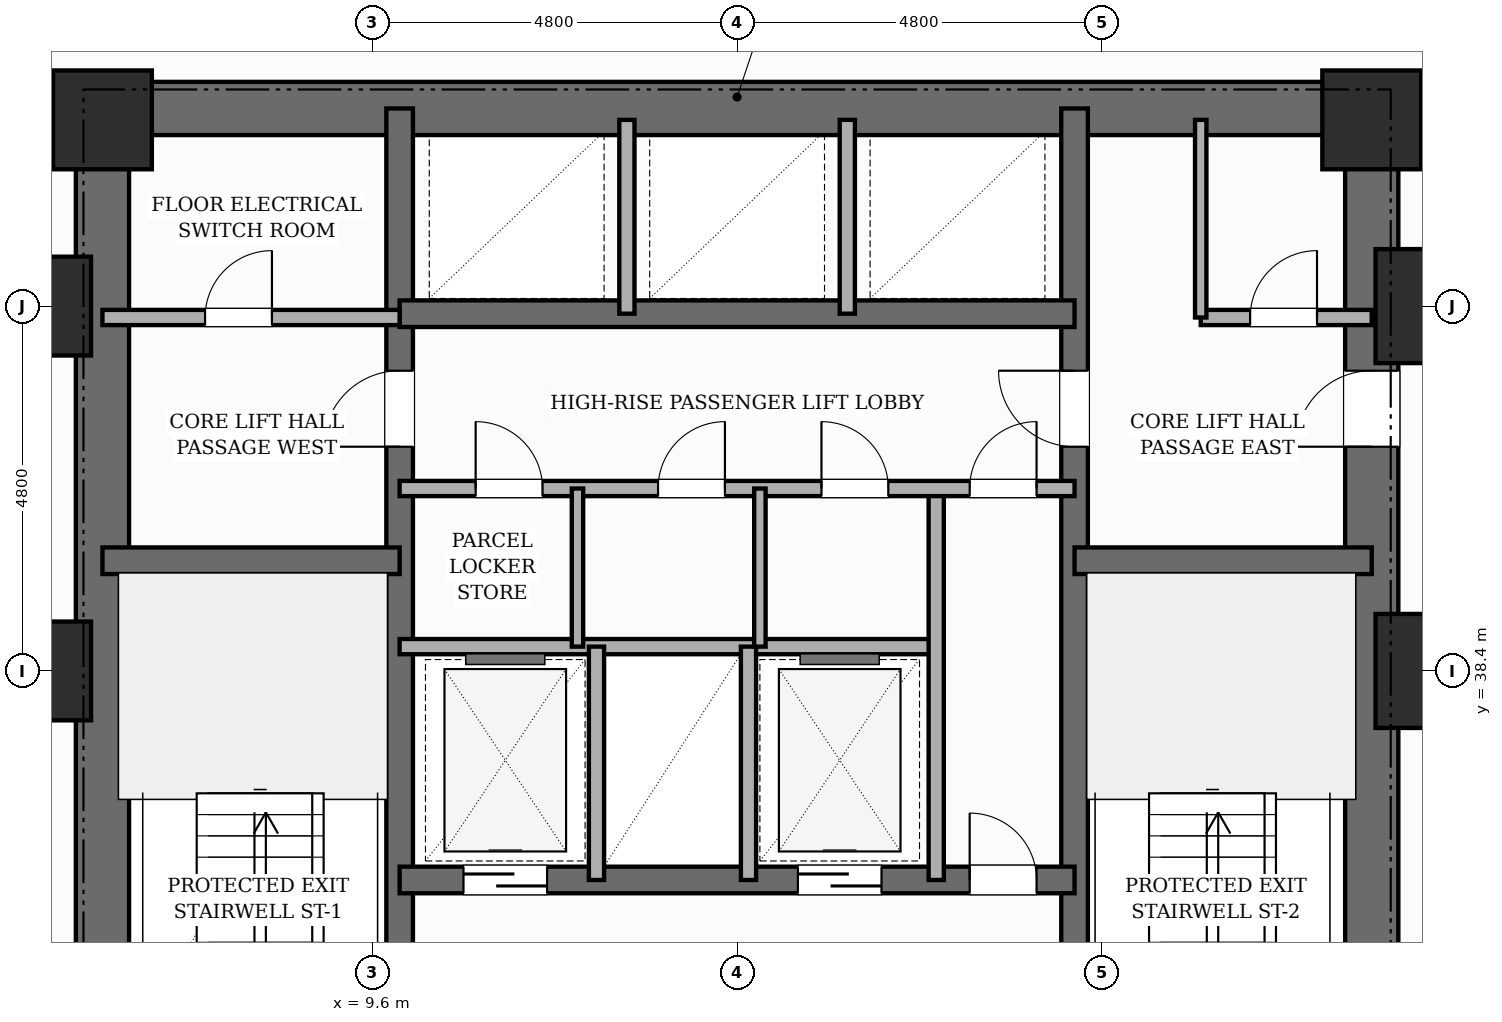
"""IFC4 building model, lengths in metres.
Left out: names, types, materials, properties, quantities, classifications, styles, units other than length and angle.
Written with IfcOpenShell. Run it as: python <this file> out.ifc"""

import sys

from ifc_helpers import new_model, si_unit, direction, frame, frame_2d, origin, origin_2d, place, context, subcontext, project, spatial, rectangle, extrude, element, fill, save


model = new_model("IFC4")
c1 = context("Model", 3, precision=1e-05, world=origin(), true_north=direction((0.0, 1.0)))
c2 = subcontext(c1, "Body", "Model", "MODEL_VIEW")
j1 = project(units=[si_unit("LENGTHUNIT", "METRE"), si_unit("PLANEANGLEUNIT", "RADIAN")], contexts=[c1])
p1 = place(None, origin())
s1 = spatial("IfcSite", under=j1, at=p1, CompositionType="ELEMENT")
p2 = place(p1, origin())
s2 = spatial("IfcBuilding", under=s1, at=p2, CompositionType="ELEMENT")
p3 = place(p2, frame((0.0, 0.0, 19.6)))
s3 = spatial("IfcBuildingStorey", under=s2, at=p3, CompositionType="ELEMENT", Elevation=19.6)
p4 = place(p3, frame((6.05, 30.55, 0.0), z_axis=(0.0, 0.0, 1.0), x_axis=(0.0, 1.0, 0.0)))
e1 = element("IfcWall", 1, at=p4, inside=s3, PredefinedType="SHEAR", context=c2, shape_type="SweptSolid", body=[
    extrude(rectangle(XDim=15.6, YDim=0.7, at=frame_2d((7.8, 0.0))), origin(), (0.0, 0.0, 1.0), 5.4),
])
p5 = place(p3, frame((22.75, 30.55, 0.0), z_axis=(0.0, 0.0, 1.0), x_axis=(0.0, 1.0, 0.0)))
e2 = element("IfcWall", 2, at=p5, inside=s3, PredefinedType="SHEAR", context=c2, shape_type="SweptSolid", body=[
    extrude(rectangle(XDim=15.6, YDim=0.7, at=frame_2d((7.8, 0.0))), origin(), (0.0, 0.0, 1.0), 5.4),
])
p6 = place(p5, frame((10.8, 0.0, 0.0)))
e3 = element("IfcOpeningElement", 3, at=p6, cuts=e2, PredefinedType="OPENING", context=c2, shape_type="SweptSolid", body=[
    extrude(rectangle(XDim=1.0, YDim=2.15, at=frame_2d((0.5, 1.075))), frame((0.0, 0.36, 0.0), z_axis=(0.0, -1.0, 0.0), x_axis=(1.0, 0.0, 0.0)), (0.0, 0.0, 1.0), 0.72),
])
p7 = place(p3, frame((6.05, 45.8, 0.0), z_axis=(0.0, 0.0, 1.0), x_axis=(1.0, 0.0, 0.0)))
e4 = element("IfcWall", 4, at=p7, inside=s3, PredefinedType="SHEAR", context=c2, shape_type="SweptSolid", body=[
    extrude(rectangle(XDim=16.7, YDim=0.7, at=frame_2d((8.35, 0.0))), origin(), (0.0, 0.0, 1.0), 5.4),
])
p8 = place(p3, frame((9.96, 30.9, 0.0), z_axis=(0.0, 0.0, 1.0), x_axis=(0.0, 1.0, 0.0)))
e5 = element("IfcWall", 5, at=p8, inside=s3, PredefinedType="SHEAR", context=c2, shape_type="SweptSolid", body=[
    extrude(rectangle(XDim=14.9, YDim=0.35, at=frame_2d((7.45, 0.0))), origin(), (0.0, 0.0, 1.0), 5.4),
])
p9 = place(p8, frame((0.65, 0.0, 0.0)))
e6 = element("IfcOpeningElement", 6, at=p9, cuts=e5, PredefinedType="OPENING", context=c2, shape_type="SweptSolid", body=[
    extrude(rectangle(XDim=0.95, YDim=2.1, at=frame_2d((0.475, 1.05))), frame((0.0, 0.185, 0.0), z_axis=(0.0, -1.0, 0.0), x_axis=(1.0, 0.0, 0.0)), (0.0, 0.0, 1.0), 0.37),
])
p10 = place(p8, frame((10.45, 0.0, 0.0)))
e7 = element("IfcOpeningElement", 7, at=p10, cuts=e5, PredefinedType="OPENING", context=c2, shape_type="SweptSolid", body=[
    extrude(rectangle(XDim=1.0, YDim=2.15, at=frame_2d((0.5, 1.075))), frame((0.0, 0.185, 0.0), z_axis=(0.0, -1.0, 0.0), x_axis=(1.0, 0.0, 0.0)), (0.0, 0.0, 1.0), 0.37),
])
p11 = place(p3, frame((18.84, 30.9, 0.0), z_axis=(0.0, 0.0, 1.0), x_axis=(0.0, 1.0, 0.0)))
e8 = element("IfcWall", 8, at=p11, inside=s3, PredefinedType="SHEAR", context=c2, shape_type="SweptSolid", body=[
    extrude(rectangle(XDim=14.9, YDim=0.35, at=frame_2d((7.45, 0.0))), origin(), (0.0, 0.0, 1.0), 5.4),
])
p12 = place(p11, frame((0.65, 0.0, 0.0)))
e9 = element("IfcOpeningElement", 9, at=p12, cuts=e8, PredefinedType="OPENING", context=c2, shape_type="SweptSolid", body=[
    extrude(rectangle(XDim=0.95, YDim=2.1, at=frame_2d((0.475, 1.05))), frame((0.0, 0.185, 0.0), z_axis=(0.0, -1.0, 0.0), x_axis=(1.0, 0.0, 0.0)), (0.0, 0.0, 1.0), 0.37),
])
p13 = place(p11, frame((10.45, 0.0, 0.0)))
e10 = element("IfcOpeningElement", 10, at=p13, cuts=e8, PredefinedType="OPENING", context=c2, shape_type="SweptSolid", body=[
    extrude(rectangle(XDim=1.0, YDim=2.15, at=frame_2d((0.5, 1.075))), frame((0.0, 0.185, 0.0), z_axis=(0.0, -1.0, 0.0), x_axis=(1.0, 0.0, 0.0)), (0.0, 0.0, 1.0), 0.37),
])
for number, where, z_axis, x_axis in (
    (11, (6.05, 39.85, 0.0), (0.0, 0.0, 1.0), (1.0, 0.0, 0.0)),
    (12, (18.84, 39.85, 0.0), (0.0, 0.0, 1.0), (1.0, 0.0, 0.0)),
):
    element("IfcWall", number, at=place(p3, frame(where, z_axis=z_axis, x_axis=x_axis)), inside=s3, PredefinedType="SHEAR", context=c2, shape_type="SweptSolid", body=[
        extrude(rectangle(XDim=3.91, YDim=0.35, at=frame_2d((1.955, 0.0))), origin(), (0.0, 0.0, 1.0), 5.4),
    ])
p14 = place(p3, frame((9.96, 35.65, 0.0), z_axis=(0.0, 0.0, 1.0), x_axis=(1.0, 0.0, 0.0)))
e13 = element("IfcWall", 13, at=p14, inside=s3, PredefinedType="SHEAR", context=c2, shape_type="SweptSolid", body=[
    extrude(rectangle(XDim=8.88, YDim=0.35, at=frame_2d((4.44, 0.0))), origin(), (0.0, 0.0, 1.0), 5.4),
])
p15 = place(p14, frame((0.84, 0.0, 0.0)))
e14 = element("IfcOpeningElement", 14, at=p15, cuts=e13, PredefinedType="OPENING", context=c2, shape_type="SweptSolid", body=[
    extrude(rectangle(XDim=1.1, YDim=2.15, at=frame_2d((0.55, 1.075))), frame((0.0, 0.185, 0.0), z_axis=(0.0, -1.0, 0.0), x_axis=(1.0, 0.0, 0.0)), (0.0, 0.0, 1.0), 0.37),
])
p16 = place(p14, frame((5.24, 0.0, 0.0)))
e15 = element("IfcOpeningElement", 15, at=p16, cuts=e13, PredefinedType="OPENING", context=c2, shape_type="SweptSolid", body=[
    extrude(rectangle(XDim=1.1, YDim=2.15, at=frame_2d((0.55, 1.075))), frame((0.0, 0.185, 0.0), z_axis=(0.0, -1.0, 0.0), x_axis=(1.0, 0.0, 0.0)), (0.0, 0.0, 1.0), 0.37),
])
p17 = place(p14, frame((7.5, 0.0, 0.0)))
e16 = element("IfcOpeningElement", 16, at=p17, cuts=e13, PredefinedType="OPENING", context=c2, shape_type="SweptSolid", body=[
    extrude(rectangle(XDim=0.88, YDim=2.1, at=frame_2d((0.44, 1.05))), frame((0.0, 0.185, 0.0), z_axis=(0.0, -1.0, 0.0), x_axis=(1.0, 0.0, 0.0)), (0.0, 0.0, 1.0), 0.37),
])
p18 = place(p3, frame((9.96, 43.1, 0.0), z_axis=(0.0, 0.0, 1.0), x_axis=(1.0, 0.0, 0.0)))
e17 = element("IfcWall", 17, at=p18, inside=s3, PredefinedType="SHEAR", context=c2, shape_type="SweptSolid", body=[
    extrude(rectangle(XDim=8.88, YDim=0.35, at=frame_2d((4.44, 0.0))), origin(), (0.0, 0.0, 1.0), 5.4),
])
for number, where, z_axis, x_axis in (
    (18, (5.25, 38.4, 0.0), (0.0, 0.0, 1.0), (1.0, 0.0, 0.0)),
    (19, (5.25, 43.2, 0.0), (0.0, 0.0, 1.0), (1.0, 0.0, 0.0)),
    (20, (6.05, 45.65, 0.0), (0.0, 0.0, 1.0), (1.0, 0.0, 0.0)),
    (21, (22.75, 45.65, 0.0), (0.0, 0.0, 1.0), (1.0, 0.0, 0.0)),
):
    element("IfcColumn", number, at=place(p3, frame(where, z_axis=z_axis, x_axis=x_axis)), inside=s3, PredefinedType="COLUMN", context=c2, shape_type="SweptSolid", body=[
        extrude(rectangle(XDim=1.3, YDim=1.3, at=origin_2d()), origin(), (0.0, 0.0, 1.0), 5.4),
    ])
for number, where, z_axis, x_axis in (
    (22, (23.55, 38.4, 0.0), (0.0, 0.0, 1.0), (1.0, 0.0, 0.0)),
    (23, (23.55, 43.2, 0.0), (0.0, 0.0, 1.0), (1.0, 0.0, 0.0)),
):
    element("IfcColumn", number, at=place(p3, frame(where, z_axis=z_axis, x_axis=x_axis)), inside=s3, PredefinedType="USERDEFINED", context=c2, shape_type="SweptSolid", body=[
        extrude(rectangle(XDim=1.5, YDim=1.5, at=origin_2d()), origin(), (0.0, 0.0, 1.0), 5.4),
    ])
p19 = place(p3, frame((9.96, 38.72, 0.0), z_axis=(0.0, 0.0, 1.0), x_axis=(1.0, 0.0, 0.0)))
e24 = element("IfcWall", 24, at=p19, inside=s3, PredefinedType="POLYGONAL", context=c2, shape_type="SweptSolid", body=[
    extrude(rectangle(XDim=7.06, YDim=0.2, at=frame_2d((3.53, 0.0))), origin(), (0.0, 0.0, 1.0), 5.15),
])
for number, where, z_axis, x_axis in (
    (25, (12.55, 35.65, 0.0), (0.0, 0.0, 1.0), (0.0, 1.0, 0.0)),
    (26, (14.55, 35.65, 0.0), (0.0, 0.0, 1.0), (0.0, 1.0, 0.0)),
):
    element("IfcWall", number, at=place(p3, frame(where, z_axis=z_axis, x_axis=x_axis)), inside=s3, PredefinedType="POLYGONAL", context=c2, shape_type="SweptSolid", body=[
        extrude(rectangle(XDim=3.07, YDim=0.2, at=frame_2d((1.535, 0.0))), origin(), (0.0, 0.0, 1.0), 5.15),
    ])
p20 = place(p3, frame((17.02, 35.65, 0.0), z_axis=(0.0, 0.0, 1.0), x_axis=(0.0, 1.0, 0.0)))
e27 = element("IfcWall", 27, at=p20, inside=s3, PredefinedType="POLYGONAL", context=c2, shape_type="SweptSolid", body=[
    extrude(rectangle(XDim=5.15, YDim=0.2, at=frame_2d((2.575, 0.0))), origin(), (0.0, 0.0, 1.0), 5.15),
])
p21 = place(p3, frame((9.96, 40.8, 0.0), z_axis=(0.0, 0.0, 1.0), x_axis=(1.0, 0.0, 0.0)))
e28 = element("IfcWall", 28, at=p21, inside=s3, PredefinedType="POLYGONAL", context=c2, shape_type="SweptSolid", body=[
    extrude(rectangle(XDim=8.88, YDim=0.2, at=frame_2d((4.44, 0.0))), origin(), (0.0, 0.0, 1.0), 5.15),
])
p22 = place(p21, frame((7.5, 0.0, 0.0)))
e29 = element("IfcOpeningElement", 29, at=p22, cuts=e28, PredefinedType="OPENING", context=c2, shape_type="SweptSolid", body=[
    extrude(rectangle(XDim=0.88, YDim=2.1, at=frame_2d((0.44, 1.05))), frame((0.0, 0.11, 0.0), z_axis=(0.0, -1.0, 0.0), x_axis=(1.0, 0.0, 0.0)), (0.0, 0.0, 1.0), 0.22),
])
p23 = place(p21, frame((1.0, 0.0, 0.0)))
e30 = element("IfcOpeningElement", 30, at=p23, cuts=e28, PredefinedType="OPENING", context=c2, shape_type="SweptSolid", body=[
    extrude(rectangle(XDim=0.88, YDim=2.1, at=frame_2d((0.44, 1.05))), frame((0.0, 0.11, 0.0), z_axis=(0.0, -1.0, 0.0), x_axis=(1.0, 0.0, 0.0)), (0.0, 0.0, 1.0), 0.22),
])
p24 = place(p21, frame((3.4, 0.0, 0.0)))
e31 = element("IfcOpeningElement", 31, at=p24, cuts=e28, PredefinedType="OPENING", context=c2, shape_type="SweptSolid", body=[
    extrude(rectangle(XDim=0.88, YDim=2.1, at=frame_2d((0.44, 1.05))), frame((0.0, 0.11, 0.0), z_axis=(0.0, -1.0, 0.0), x_axis=(1.0, 0.0, 0.0)), (0.0, 0.0, 1.0), 0.22),
])
p25 = place(p21, frame((5.55, 0.0, 0.0)))
e32 = element("IfcOpeningElement", 32, at=p25, cuts=e28, PredefinedType="OPENING", context=c2, shape_type="SweptSolid", body=[
    extrude(rectangle(XDim=0.88, YDim=2.1, at=frame_2d((0.44, 1.05))), frame((0.0, 0.11, 0.0), z_axis=(0.0, -1.0, 0.0), x_axis=(1.0, 0.0, 0.0)), (0.0, 0.0, 1.0), 0.22),
])
p26 = place(p3, frame((20.5, 43.05, 0.0), z_axis=(0.0, 0.0, 1.0), x_axis=(1.0, 0.0, 0.0)))
e33 = element("IfcWall", 33, at=p26, inside=s3, PredefinedType="POLYGONAL", context=c2, shape_type="SweptSolid", body=[
    extrude(rectangle(XDim=2.25, YDim=0.2, at=frame_2d((1.125, 0.0))), origin(), (0.0, 0.0, 1.0), 4.23),
])
p27 = place(p26, frame((0.65, 0.0, 0.0)))
e34 = element("IfcOpeningElement", 34, at=p27, cuts=e33, PredefinedType="OPENING", context=c2, shape_type="SweptSolid", body=[
    extrude(rectangle(XDim=0.88, YDim=2.1, at=frame_2d((0.44, 1.05))), frame((0.0, 0.11, 0.0), z_axis=(0.0, -1.0, 0.0), x_axis=(1.0, 0.0, 0.0)), (0.0, 0.0, 1.0), 0.22),
])
p28 = place(p3, frame((6.05, 43.05, 0.0), z_axis=(0.0, 0.0, 1.0), x_axis=(1.0, 0.0, 0.0)))
e35 = element("IfcWall", 35, at=p28, inside=s3, PredefinedType="POLYGONAL", context=c2, shape_type="SweptSolid", body=[
    extrude(rectangle(XDim=3.91, YDim=0.2, at=frame_2d((1.955, 0.0))), origin(), (0.0, 0.0, 1.0), 4.23),
])
p29 = place(p28, frame((1.35, 0.0, 0.0)))
e36 = element("IfcOpeningElement", 36, at=p29, cuts=e35, PredefinedType="OPENING", context=c2, shape_type="SweptSolid", body=[
    extrude(rectangle(XDim=0.88, YDim=2.1, at=frame_2d((0.44, 1.05))), frame((0.0, 0.11, 0.0), z_axis=(0.0, -1.0, 0.0), x_axis=(1.0, 0.0, 0.0)), (0.0, 0.0, 1.0), 0.22),
])
for number, where, z_axis, x_axis in (
    (37, (12.95, 43.1, 0.0), (0.0, 0.0, 1.0), (0.0, 1.0, 0.0)),
    (38, (15.85, 43.1, 0.0), (0.0, 0.0, 1.0), (0.0, 1.0, 0.0)),
):
    element("IfcWall", number, at=place(p3, frame(where, z_axis=z_axis, x_axis=x_axis)), inside=s3, PredefinedType="POLYGONAL", context=c2, shape_type="SweptSolid", body=[
        extrude(rectangle(XDim=2.55, YDim=0.2, at=frame_2d((1.275, 0.0))), origin(), (0.0, 0.0, 1.0), 5.15),
    ])
for number, where, z_axis, x_axis in (
    (39, (12.3, 38.72, 0.0), (0.0, 0.0, 1.0), (0.0, 1.0, 0.0)),
    (40, (14.7, 38.72, 0.0), (0.0, 0.0, 1.0), (0.0, 1.0, 0.0)),
):
    element("IfcWall", number, at=place(p3, frame(where, z_axis=z_axis, x_axis=x_axis)), inside=s3, PredefinedType="PARTITIONING", context=c2, shape_type="SweptSolid", body=[
        extrude(rectangle(XDim=2.08, YDim=0.15, at=frame_2d((1.04, 0.0))), origin(), (0.0, 0.0, 1.0), 5.15),
    ])
p30 = place(p3, frame((20.5, 43.05, 0.0), z_axis=(0.0, 0.0, 1.0), x_axis=(0.0, 1.0, 0.0)))
e41 = element("IfcWall", 41, at=p30, inside=s3, PredefinedType="PARTITIONING", context=c2, shape_type="SweptSolid", body=[
    extrude(rectangle(XDim=2.6, YDim=0.15, at=frame_2d((1.3, 0.0))), origin(), (0.0, 0.0, 1.0), 5.15),
])
p31 = place(p15, origin())
e42 = element("IfcDoor", 42, at=p31, inside=s3, OperationType="SLIDING_TO_LEFT", PredefinedType="DOOR", context=c2, shape_type="SweptSolid", body=[
    extrude(rectangle(XDim=1.1, YDim=2.15, at=frame_2d((0.55, 1.075))), frame((0.0, 0.025, 0.0), z_axis=(0.0, -1.0, 0.0), x_axis=(1.0, 0.0, 0.0)), (0.0, 0.0, 1.0), 0.05),
])
fill(e14, e42)
p32 = place(p16, origin())
e43 = element("IfcDoor", 43, at=p32, inside=s3, OperationType="SLIDING_TO_RIGHT", PredefinedType="DOOR", context=c2, shape_type="SweptSolid", body=[
    extrude(rectangle(XDim=1.1, YDim=2.15, at=frame_2d((0.55, 1.075))), frame((0.0, 0.025, 0.0), z_axis=(0.0, -1.0, 0.0), x_axis=(1.0, 0.0, 0.0)), (0.0, 0.0, 1.0), 0.05),
])
fill(e15, e43)
p33 = place(p17, origin())
e44 = element("IfcDoor", 44, at=p33, inside=s3, OperationType="SINGLE_SWING_LEFT", PredefinedType="DOOR", context=c2, shape_type="SweptSolid", body=[
    extrude(rectangle(XDim=0.88, YDim=2.1, at=frame_2d((0.44, 1.05))), frame((0.0, 0.025, 0.0), z_axis=(0.0, -1.0, 0.0), x_axis=(1.0, 0.0, 0.0)), (0.0, 0.0, 1.0), 0.05),
])
fill(e16, e44)
p34 = place(p22, origin())
e45 = element("IfcDoor", 45, at=p34, inside=s3, OperationType="SINGLE_SWING_RIGHT", PredefinedType="DOOR", context=c2, shape_type="SweptSolid", body=[
    extrude(rectangle(XDim=0.88, YDim=2.1, at=frame_2d((0.44, 1.05))), frame((0.0, 0.025, 0.0), z_axis=(0.0, -1.0, 0.0), x_axis=(1.0, 0.0, 0.0)), (0.0, 0.0, 1.0), 0.05),
])
fill(e29, e45)
p35 = place(p10, origin())
e46 = element("IfcDoor", 46, at=p35, inside=s3, OperationType="SINGLE_SWING_LEFT", PredefinedType="DOOR", context=c2, shape_type="SweptSolid", body=[
    extrude(rectangle(XDim=1.0, YDim=2.15, at=frame_2d((0.5, 1.075))), frame((0.0, 0.025, 0.0), z_axis=(0.0, -1.0, 0.0), x_axis=(1.0, 0.0, 0.0)), (0.0, 0.0, 1.0), 0.05),
])
fill(e7, e46)
p36 = place(p13, origin())
e47 = element("IfcDoor", 47, at=p36, inside=s3, OperationType="SINGLE_SWING_RIGHT", PredefinedType="DOOR", context=c2, shape_type="SweptSolid", body=[
    extrude(rectangle(XDim=1.0, YDim=2.15, at=frame_2d((0.5, 1.075))), frame((0.0, 0.025, 0.0), z_axis=(0.0, -1.0, 0.0), x_axis=(1.0, 0.0, 0.0)), (0.0, 0.0, 1.0), 0.05),
])
fill(e10, e47)
p37 = place(p6, origin())
e48 = element("IfcDoor", 48, at=p37, inside=s3, OperationType="SINGLE_SWING_LEFT", PredefinedType="DOOR", context=c2, shape_type="SweptSolid", body=[
    extrude(rectangle(XDim=1.0, YDim=2.15, at=frame_2d((0.5, 1.075))), frame((0.0, 0.025, 0.0), z_axis=(0.0, -1.0, 0.0), x_axis=(1.0, 0.0, 0.0)), (0.0, 0.0, 1.0), 0.05),
])
fill(e3, e48)
p38 = place(p29, origin())
e49 = element("IfcDoor", 49, at=p38, inside=s3, OperationType="SINGLE_SWING_RIGHT", PredefinedType="DOOR", context=c2, shape_type="SweptSolid", body=[
    extrude(rectangle(XDim=0.88, YDim=2.1, at=frame_2d((0.44, 1.05))), frame((0.0, 0.025, 0.0), z_axis=(0.0, -1.0, 0.0), x_axis=(1.0, 0.0, 0.0)), (0.0, 0.0, 1.0), 0.05),
])
fill(e36, e49)
p39 = place(p23, origin())
e50 = element("IfcDoor", 50, at=p39, inside=s3, OperationType="SINGLE_SWING_LEFT", PredefinedType="DOOR", context=c2, shape_type="SweptSolid", body=[
    extrude(rectangle(XDim=0.88, YDim=2.1, at=frame_2d((0.44, 1.05))), frame((0.0, 0.025, 0.0), z_axis=(0.0, -1.0, 0.0), x_axis=(1.0, 0.0, 0.0)), (0.0, 0.0, 1.0), 0.05),
])
fill(e30, e50)
p40 = place(p24, origin())
e51 = element("IfcDoor", 51, at=p40, inside=s3, OperationType="SINGLE_SWING_RIGHT", PredefinedType="DOOR", context=c2, shape_type="SweptSolid", body=[
    extrude(rectangle(XDim=0.88, YDim=2.1, at=frame_2d((0.44, 1.05))), frame((0.0, 0.025, 0.0), z_axis=(0.0, -1.0, 0.0), x_axis=(1.0, 0.0, 0.0)), (0.0, 0.0, 1.0), 0.05),
])
fill(e31, e51)
p41 = place(p25, origin())
e52 = element("IfcDoor", 52, at=p41, inside=s3, OperationType="SINGLE_SWING_LEFT", PredefinedType="DOOR", context=c2, shape_type="SweptSolid", body=[
    extrude(rectangle(XDim=0.88, YDim=2.1, at=frame_2d((0.44, 1.05))), frame((0.0, 0.025, 0.0), z_axis=(0.0, -1.0, 0.0), x_axis=(1.0, 0.0, 0.0)), (0.0, 0.0, 1.0), 0.05),
])
fill(e32, e52)
p42 = place(p27, origin())
e53 = element("IfcDoor", 53, at=p42, inside=s3, OperationType="SINGLE_SWING_RIGHT", PredefinedType="DOOR", context=c2, shape_type="SweptSolid", body=[
    extrude(rectangle(XDim=0.88, YDim=2.1, at=frame_2d((0.44, 1.05))), frame((0.0, 0.025, 0.0), z_axis=(0.0, -1.0, 0.0), x_axis=(1.0, 0.0, 0.0)), (0.0, 0.0, 1.0), 0.05),
])
fill(e34, e53)
save(model, sys.argv[1])
